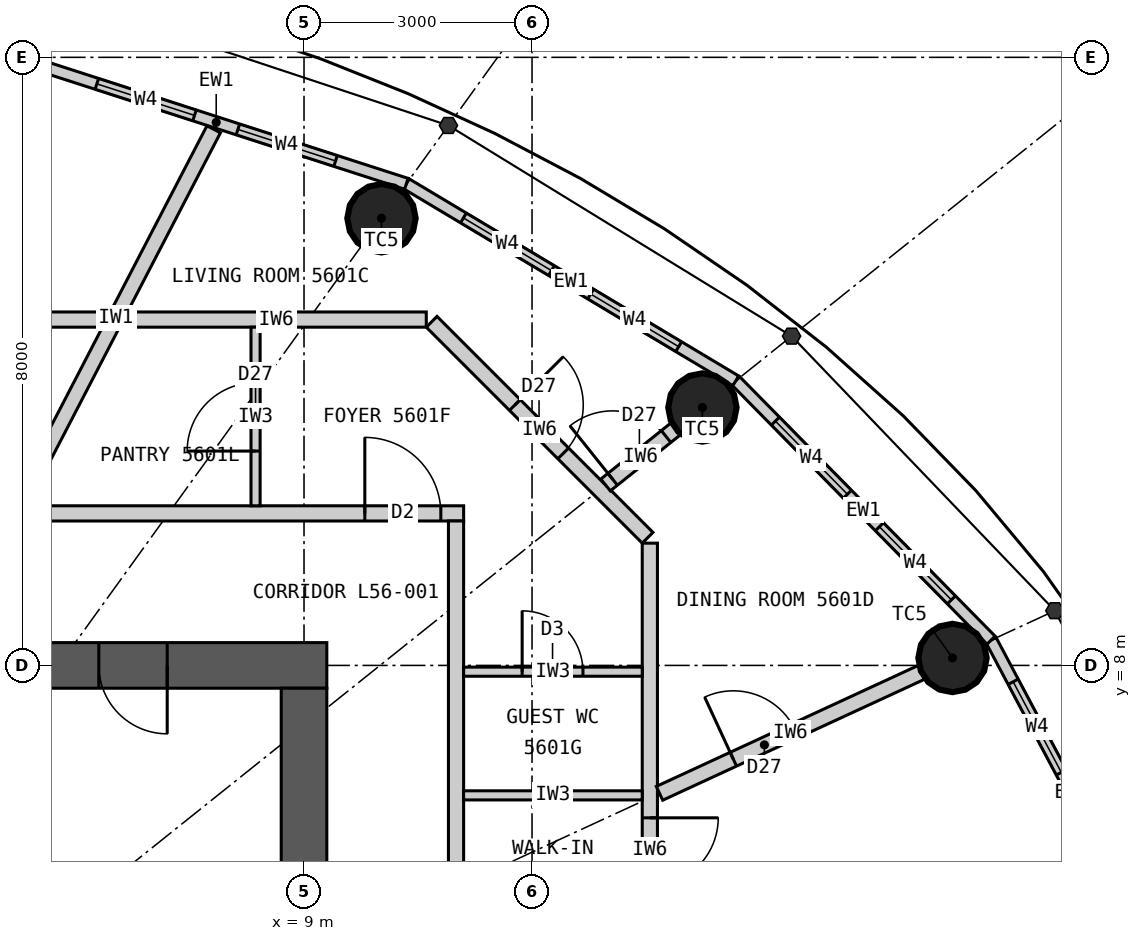
"""IFC4 building model, lengths in metres.
Left out: names, types, materials, properties, quantities, classifications, styles, units other than length and angle.
Written with IfcOpenShell. Run it as: python <this file> out.ifc"""

import sys

from ifc_helpers import new_model, si_unit, direction, frame, frame_2d, origin, origin_2d, place, context, subcontext, project, spatial, rectangle, circle, extrude, element, fill, save


model = new_model("IFC4")
c1 = context("Model", 3, precision=1e-05, world=origin(), true_north=direction((0.0, 1.0)))
c2 = subcontext(c1, "Body", "Model", "MODEL_VIEW")
j1 = project(units=[si_unit("LENGTHUNIT", "METRE"), si_unit("PLANEANGLEUNIT", "RADIAN")], contexts=[c1])
p1 = place(None, origin())
s1 = spatial("IfcSite", under=j1, at=p1, CompositionType="ELEMENT")
p2 = place(p1, origin())
s2 = spatial("IfcBuilding", under=s1, at=p2, CompositionType="ELEMENT")
p3 = place(p2, frame((0.0, 0.0, 209.4)))
s3 = spatial("IfcBuildingStorey", under=s2, at=p3, CompositionType="ELEMENT", Elevation=209.4)
for number, where, z_axis, x_axis in (
    (1, (17.532, 8.098, 0.0), (0.0, 0.0, 1.0), (1.0, 0.0, 0.0)),
    (2, (14.241, 11.393, 0.0), (0.0, 0.0, 1.0), (1.0, 0.0, 0.0)),
    (3, (10.019, 13.883, 0.0), (0.0, 0.0, 1.0), (1.0, 0.0, 0.0)),
):
    element("IfcColumn", number, at=place(p3, frame(where, z_axis=z_axis, x_axis=x_axis)), inside=s3, PredefinedType="COLUMN", context=c2, shape_type="SweptSolid", body=[
        extrude(circle(Radius=0.45, at=origin_2d()), origin(), (0.0, 0.0, 1.0), 3.3),
    ])
p4 = place(p3, frame((-9.3, 8.0, 0.0), z_axis=(0.0, 0.0, 1.0), x_axis=(1.0, 0.0, 0.0)))
e4 = element("IfcWall", 4, at=p4, inside=s3, PredefinedType="SHEAR", context=c2, shape_type="SweptSolid", body=[
    extrude(rectangle(XDim=18.6, YDim=0.6, at=frame_2d((9.3, 0.0))), origin(), (0.0, 0.0, 1.0), 3.3),
])
p5 = place(p4, frame((8.0, 0.0, 0.0)))
e5 = element("IfcOpeningElement", 5, at=p5, cuts=e4, PredefinedType="OPENING", context=c2, shape_type="SweptSolid", body=[
    extrude(rectangle(XDim=1.2, YDim=2.2, at=frame_2d((0.6, 1.1))), frame((0.0, 0.31, 0.0), z_axis=(0.0, -1.0, 0.0), x_axis=(1.0, 0.0, 0.0)), (0.0, 0.0, 1.0), 0.62),
])
p6 = place(p4, frame((15.6, 0.0, 0.0)))
e6 = element("IfcOpeningElement", 6, at=p6, cuts=e4, PredefinedType="OPENING", context=c2, shape_type="SweptSolid", body=[
    extrude(rectangle(XDim=0.9, YDim=2.2, at=frame_2d((0.45, 1.1))), frame((0.0, 0.31, 0.0), z_axis=(0.0, -1.0, 0.0), x_axis=(1.0, 0.0, 0.0)), (0.0, 0.0, 1.0), 0.62),
])
p7 = place(p3, frame((9.0, -7.7, 0.0), z_axis=(0.0, 0.0, 1.0), x_axis=(0.0, 1.0, 0.0)))
e7 = element("IfcWall", 7, at=p7, inside=s3, PredefinedType="SHEAR", context=c2, shape_type="SweptSolid", body=[
    extrude(rectangle(XDim=15.4, YDim=0.6, at=frame_2d((7.7, 0.0))), origin(), (0.0, 0.0, 1.0), 3.3),
])
p8 = place(p7, frame((6.8, 0.0, 0.0)))
e8 = element("IfcOpeningElement", 8, at=p8, cuts=e7, PredefinedType="OPENING", context=c2, shape_type="SweptSolid", body=[
    extrude(rectangle(XDim=1.8, YDim=2.2, at=frame_2d((0.9, 1.1))), frame((0.0, 0.31, 0.0), z_axis=(0.0, -1.0, 0.0), x_axis=(1.0, 0.0, 0.0)), (0.0, 0.0, 1.0), 0.62),
])
p9 = place(p3, frame((20.17, 4.323, 0.0), z_axis=(0.0, 0.0, 1.0), x_axis=(-0.469256152955, 0.883062094597, 0.0)))
e9 = element("IfcWall", 9, at=p9, inside=s3, PredefinedType="ELEMENTEDWALL", context=c2, shape_type="SweptSolid", body=[
    extrude(rectangle(XDim=4.539, YDim=0.15, at=frame_2d((2.27, 0.0))), origin(), (0.0, 0.0, 1.0), 3.12),
])
p10 = place(p9, frame((0.62, 0.0, 0.9)))
e10 = element("IfcOpeningElement", 10, at=p10, cuts=e9, PredefinedType="OPENING", context=c2, shape_type="SweptSolid", body=[
    extrude(rectangle(XDim=1.35, YDim=1.9, at=frame_2d((0.675, 0.95))), frame((0.0, 0.085, 0.0), z_axis=(0.0, -1.0, 0.0), x_axis=(1.0, 0.0, 0.0)), (0.0, 0.0, 1.0), 0.17),
])
p11 = place(p9, frame((2.57, 0.0, 0.9)))
e11 = element("IfcOpeningElement", 11, at=p11, cuts=e9, PredefinedType="OPENING", context=c2, shape_type="SweptSolid", body=[
    extrude(rectangle(XDim=1.35, YDim=1.9, at=frame_2d((0.675, 0.95))), frame((0.0, 0.085, 0.0), z_axis=(0.0, -1.0, 0.0), x_axis=(1.0, 0.0, 0.0)), (0.0, 0.0, 1.0), 0.17),
])
p12 = place(p3, frame((18.04, 8.332, 0.0), z_axis=(0.0, 0.0, 1.0), x_axis=(-0.701527379618, 0.712642501993, 0.0)))
e12 = element("IfcWall", 12, at=p12, inside=s3, PredefinedType="ELEMENTEDWALL", context=c2, shape_type="SweptSolid", body=[
    extrude(rectangle(XDim=4.788, YDim=0.15, at=frame_2d((2.394, 0.0))), origin(), (0.0, 0.0, 1.0), 3.12),
])
p13 = place(p12, frame((0.744, 0.0, 0.9)))
e13 = element("IfcOpeningElement", 13, at=p13, cuts=e12, PredefinedType="OPENING", context=c2, shape_type="SweptSolid", body=[
    extrude(rectangle(XDim=1.35, YDim=1.9, at=frame_2d((0.675, 0.95))), frame((0.0, 0.085, 0.0), z_axis=(0.0, -1.0, 0.0), x_axis=(1.0, 0.0, 0.0)), (0.0, 0.0, 1.0), 0.17),
])
p14 = place(p12, frame((2.694, 0.0, 0.9)))
e14 = element("IfcOpeningElement", 14, at=p14, cuts=e12, PredefinedType="OPENING", context=c2, shape_type="SweptSolid", body=[
    extrude(rectangle(XDim=1.35, YDim=1.9, at=frame_2d((0.675, 0.95))), frame((0.0, 0.085, 0.0), z_axis=(0.0, -1.0, 0.0), x_axis=(1.0, 0.0, 0.0)), (0.0, 0.0, 1.0), 0.17),
])
p15 = place(p3, frame((14.68, 11.744, 0.0), z_axis=(0.0, 0.0, 1.0), x_axis=(-0.85822150553, 0.513279502265, 0.0)))
e15 = element("IfcWall", 15, at=p15, inside=s3, PredefinedType="ELEMENTEDWALL", context=c2, shape_type="SweptSolid", body=[
    extrude(rectangle(XDim=5.05, YDim=0.15, at=frame_2d((2.525, 0.0))), origin(), (0.0, 0.0, 1.0), 3.12),
])
p16 = place(p15, frame((0.875, 0.0, 0.9)))
e16 = element("IfcOpeningElement", 16, at=p16, cuts=e15, PredefinedType="OPENING", context=c2, shape_type="SweptSolid", body=[
    extrude(rectangle(XDim=1.35, YDim=1.9, at=frame_2d((0.675, 0.95))), frame((0.0, 0.085, 0.0), z_axis=(0.0, -1.0, 0.0), x_axis=(1.0, 0.0, 0.0)), (0.0, 0.0, 1.0), 0.17),
])
p17 = place(p15, frame((2.825, 0.0, 0.9)))
e17 = element("IfcOpeningElement", 17, at=p17, cuts=e15, PredefinedType="OPENING", context=c2, shape_type="SweptSolid", body=[
    extrude(rectangle(XDim=1.35, YDim=1.9, at=frame_2d((0.675, 0.95))), frame((0.0, 0.085, 0.0), z_axis=(0.0, -1.0, 0.0), x_axis=(1.0, 0.0, 0.0)), (0.0, 0.0, 1.0), 0.17),
])
p18 = place(p3, frame((10.346, 14.336, 0.0), z_axis=(0.0, 0.0, 1.0), x_axis=(-0.951644702515, 0.307200846638, 0.0)))
e18 = element("IfcWall", 18, at=p18, inside=s3, PredefinedType="ELEMENTEDWALL", context=c2, shape_type="SweptSolid", body=[
    extrude(rectangle(XDim=5.258, YDim=0.15, at=frame_2d((2.629, 0.0))), origin(), (0.0, 0.0, 1.0), 3.12),
])
p19 = place(p18, frame((0.979, 0.0, 0.9)))
e19 = element("IfcOpeningElement", 19, at=p19, cuts=e18, PredefinedType="OPENING", context=c2, shape_type="SweptSolid", body=[
    extrude(rectangle(XDim=1.35, YDim=1.9, at=frame_2d((0.675, 0.95))), frame((0.0, 0.085, 0.0), z_axis=(0.0, -1.0, 0.0), x_axis=(1.0, 0.0, 0.0)), (0.0, 0.0, 1.0), 0.17),
])
p20 = place(p18, frame((2.929, 0.0, 0.9)))
e20 = element("IfcOpeningElement", 20, at=p20, cuts=e18, PredefinedType="OPENING", context=c2, shape_type="SweptSolid", body=[
    extrude(rectangle(XDim=1.35, YDim=1.9, at=frame_2d((0.675, 0.95))), frame((0.0, 0.085, 0.0), z_axis=(0.0, -1.0, 0.0), x_axis=(1.0, 0.0, 0.0)), (0.0, 0.0, 1.0), 0.17),
])
p21 = place(p3, frame((-11.1, 10.0, 0.0), z_axis=(0.0, 0.0, 1.0), x_axis=(1.0, 0.0, 0.0)))
e21 = element("IfcWall", 21, at=p21, inside=s3, PredefinedType="PARTITIONING", context=c2, shape_type="SweptSolid", body=[
    extrude(rectangle(XDim=22.2, YDim=0.2, at=frame_2d((11.1, 0.0))), origin(), (0.0, 0.0, 1.0), 3.12),
])
p22 = place(p21, frame((20.9, 0.0, 0.0)))
e22 = element("IfcOpeningElement", 22, at=p22, cuts=e21, PredefinedType="OPENING", context=c2, shape_type="SweptSolid", body=[
    extrude(rectangle(XDim=1.0, YDim=2.2, at=frame_2d((0.5, 1.1))), frame((0.0, 0.11, 0.0), z_axis=(0.0, -1.0, 0.0), x_axis=(1.0, 0.0, 0.0)), (0.0, 0.0, 1.0), 0.22),
])
p23 = place(p21, frame((4.329, 0.0, 0.0)))
e23 = element("IfcOpeningElement", 23, at=p23, cuts=e21, PredefinedType="OPENING", context=c2, shape_type="SweptSolid", body=[
    extrude(rectangle(XDim=1.0, YDim=2.2, at=frame_2d((0.5, 1.1))), frame((0.0, 0.11, 0.0), z_axis=(0.0, -1.0, 0.0), x_axis=(1.0, 0.0, 0.0)), (0.0, 0.0, 1.0), 0.22),
])
p24 = place(p3, frame((11.0, -9.9, 0.0), z_axis=(0.0, 0.0, 1.0), x_axis=(0.0, 1.0, 0.0)))
e24 = element("IfcWall", 24, at=p24, inside=s3, PredefinedType="PARTITIONING", context=c2, shape_type="SweptSolid", body=[
    extrude(rectangle(XDim=19.8, YDim=0.2, at=frame_2d((9.9, 0.0))), origin(), (0.0, 0.0, 1.0), 3.12),
])
p25 = place(p3, frame((5.241, 10.1, 0.0), z_axis=(0.0, 0.0, 1.0), x_axis=(0.460603196597, 0.887606160008, 0.0)))
e25 = element("IfcWall", 25, at=p25, inside=s3, PredefinedType="PARTITIONING", context=c2, shape_type="SweptSolid", body=[
    extrude(rectangle(XDim=5.58, YDim=0.2, at=frame_2d((2.79, 0.0))), origin(), (0.0, 0.0, 1.0), 3.12),
])
p26 = place(p3, frame((13.55, 1.525, 0.0), z_axis=(0.0, 0.0, 1.0), x_axis=(0.0, 1.0, 0.0)))
e26 = element("IfcWall", 26, at=p26, inside=s3, PredefinedType="PARTITIONING", context=c2, shape_type="SweptSolid", body=[
    extrude(rectangle(XDim=8.084, YDim=0.2, at=frame_2d((4.042, 0.0))), origin(), (0.0, 0.0, 1.0), 3.12),
])
p27 = place(p26, frame((1.597, 0.0, 0.0)))
e27 = element("IfcOpeningElement", 27, at=p27, cuts=e26, PredefinedType="OPENING", context=c2, shape_type="SweptSolid", body=[
    extrude(rectangle(XDim=0.8, YDim=2.1, at=frame_2d((0.4, 1.05))), frame((0.0, 0.11, 0.0), z_axis=(0.0, -1.0, 0.0), x_axis=(1.0, 0.0, 0.0)), (0.0, 0.0, 1.0), 0.22),
])
p28 = place(p26, frame((3.57, 0.0, 0.0)))
e28 = element("IfcOpeningElement", 28, at=p28, cuts=e26, PredefinedType="OPENING", context=c2, shape_type="SweptSolid", body=[
    extrude(rectangle(XDim=0.9, YDim=2.1, at=frame_2d((0.45, 1.05))), frame((0.0, 0.11, 0.0), z_axis=(0.0, -1.0, 0.0), x_axis=(1.0, 0.0, 0.0)), (0.0, 0.0, 1.0), 0.22),
])
p29 = place(p3, frame((13.521, 9.679, 0.0), z_axis=(0.0, 0.0, 1.0), x_axis=(-0.707106781187, 0.707106781187, 0.0)))
e29 = element("IfcWall", 29, at=p29, inside=s3, PredefinedType="PARTITIONING", context=c2, shape_type="SweptSolid", body=[
    extrude(rectangle(XDim=4.019, YDim=0.2, at=frame_2d((2.009, 0.0))), origin(), (0.0, 0.0, 1.0), 3.12),
])
p30 = place(p29, frame((1.57, 0.0, 0.0)))
e30 = element("IfcOpeningElement", 30, at=p30, cuts=e29, PredefinedType="OPENING", context=c2, shape_type="SweptSolid", body=[
    extrude(rectangle(XDim=0.9, YDim=2.1, at=frame_2d((0.45, 1.05))), frame((0.0, 0.11, 0.0), z_axis=(0.0, -1.0, 0.0), x_axis=(1.0, 0.0, 0.0)), (0.0, 0.0, 1.0), 0.22),
])
p31 = place(p3, frame((10.609, 12.55, 0.0), z_axis=(0.0, 0.0, 1.0), x_axis=(-1.0, 0.0, 0.0)))
e31 = element("IfcWall", 31, at=p31, inside=s3, PredefinedType="PARTITIONING", context=c2, shape_type="SweptSolid", body=[
    extrude(rectangle(XDim=3.947, YDim=0.2, at=frame_2d((1.974, 0.0))), origin(), (0.0, 0.0, 1.0), 3.12),
])
p32 = place(p3, frame((13.677, 6.317, 0.0), z_axis=(0.0, 0.0, 1.0), x_axis=(0.907825704695, 0.419347695708, 0.0)))
e32 = element("IfcWall", 32, at=p32, inside=s3, PredefinedType="PARTITIONING", context=c2, shape_type="SweptSolid", body=[
    extrude(rectangle(XDim=3.796, YDim=0.2, at=frame_2d((1.898, 0.0))), origin(), (0.0, 0.0, 1.0), 2.32),
])
p33 = place(p32, frame((1.07, 0.0, 0.0)))
e33 = element("IfcOpeningElement", 33, at=p33, cuts=e32, PredefinedType="OPENING", context=c2, shape_type="SweptSolid", body=[
    extrude(rectangle(XDim=0.9, YDim=2.1, at=frame_2d((0.45, 1.05))), frame((0.0, 0.11, 0.0), z_axis=(0.0, -1.0, 0.0), x_axis=(1.0, 0.0, 0.0)), (0.0, 0.0, 1.0), 0.22),
])
p34 = place(p3, frame((12.968, 10.374, 0.0), z_axis=(0.0, 0.0, 1.0), x_axis=(0.780888968944, 0.624669847345, 0.0)))
e34 = element("IfcWall", 34, at=p34, inside=s3, PredefinedType="PARTITIONING", context=c2, shape_type="SweptSolid", body=[
    extrude(rectangle(XDim=1.181, YDim=0.2, at=frame_2d((0.591, 0.0))), origin(), (0.0, 0.0, 1.0), 2.42),
])
p35 = place(p34, frame((0.12, 0.0, 0.0)))
e35 = element("IfcOpeningElement", 35, at=p35, cuts=e34, PredefinedType="OPENING", context=c2, shape_type="SweptSolid", body=[
    extrude(rectangle(XDim=0.9, YDim=2.1, at=frame_2d((0.45, 1.05))), frame((0.0, 0.11, 0.0), z_axis=(0.0, -1.0, 0.0), x_axis=(1.0, 0.0, 0.0)), (0.0, 0.0, 1.0), 0.22),
])
p36 = place(p3, frame((11.1, 6.29, 0.0), z_axis=(0.0, 0.0, 1.0), x_axis=(1.0, 0.0, 0.0)))
e36 = element("IfcWall", 36, at=p36, inside=s3, PredefinedType="PARTITIONING", context=c2, shape_type="SweptSolid", body=[
    extrude(rectangle(XDim=2.35, YDim=0.12, at=frame_2d((1.175, 0.0))), origin(), (0.0, 0.0, 1.0), 3.12),
])
p37 = place(p3, frame((11.1, 7.917, 0.0), z_axis=(0.0, 0.0, 1.0), x_axis=(1.0, 0.0, 0.0)))
e37 = element("IfcWall", 37, at=p37, inside=s3, PredefinedType="PARTITIONING", context=c2, shape_type="SweptSolid", body=[
    extrude(rectangle(XDim=2.35, YDim=0.12, at=frame_2d((1.175, 0.0))), origin(), (0.0, 0.0, 1.0), 3.12),
])
p38 = place(p37, frame((0.77, 0.0, 0.0)))
e38 = element("IfcOpeningElement", 38, at=p38, cuts=e37, PredefinedType="OPENING", context=c2, shape_type="SweptSolid", body=[
    extrude(rectangle(XDim=0.8, YDim=2.1, at=frame_2d((0.4, 1.05))), frame((0.0, 0.07, 0.0), z_axis=(0.0, -1.0, 0.0), x_axis=(1.0, 0.0, 0.0)), (0.0, 0.0, 1.0), 0.14),
])
p39 = place(p3, frame((8.363, 10.1, 0.0), z_axis=(0.0, 0.0, 1.0), x_axis=(0.0, 1.0, 0.0)))
e39 = element("IfcWall", 39, at=p39, inside=s3, PredefinedType="PARTITIONING", context=c2, shape_type="SweptSolid", body=[
    extrude(rectangle(XDim=2.35, YDim=0.12, at=frame_2d((1.175, 0.0))), origin(), (0.0, 0.0, 1.0), 3.12),
])
p40 = place(p39, frame((0.72, 0.0, 0.0)))
e40 = element("IfcOpeningElement", 40, at=p40, cuts=e39, PredefinedType="OPENING", context=c2, shape_type="SweptSolid", body=[
    extrude(rectangle(XDim=0.9, YDim=2.1, at=frame_2d((0.45, 1.05))), frame((0.0, 0.07, 0.0), z_axis=(0.0, -1.0, 0.0), x_axis=(1.0, 0.0, 0.0)), (0.0, 0.0, 1.0), 0.14),
])
p41 = place(p3, frame((6.364, 12.55, 0.0), z_axis=(0.0, 0.0, 1.0), x_axis=(-1.0, 0.0, 0.0)))
e41 = element("IfcWall", 41, at=p41, inside=s3, PredefinedType="PARTITIONING", context=c2, shape_type="SweptSolid", body=[
    extrude(rectangle(XDim=16.972, YDim=0.2, at=frame_2d((8.486, 0.0))), origin(), (0.0, 0.0, 1.0), 3.12),
])
p42 = place(p41, frame((2.525, 0.0, 0.0)))
e42 = element("IfcOpeningElement", 42, at=p42, cuts=e41, PredefinedType="OPENING", context=c2, shape_type="SweptSolid", body=[
    extrude(rectangle(XDim=0.8, YDim=2.1, at=frame_2d((0.4, 1.05))), frame((0.0, 0.11, 0.0), z_axis=(0.0, -1.0, 0.0), x_axis=(1.0, 0.0, 0.0)), (0.0, 0.0, 1.0), 0.22),
])
p43 = place(p41, frame((4.145, 0.0, 0.0)))
e43 = element("IfcOpeningElement", 43, at=p43, cuts=e41, PredefinedType="OPENING", context=c2, shape_type="SweptSolid", body=[
    extrude(rectangle(XDim=0.9, YDim=2.1, at=frame_2d((0.45, 1.05))), frame((0.0, 0.11, 0.0), z_axis=(0.0, -1.0, 0.0), x_axis=(1.0, 0.0, 0.0)), (0.0, 0.0, 1.0), 0.22),
])
p44 = place(p41, frame((13.52, 0.0, 0.0)))
e44 = element("IfcOpeningElement", 44, at=p44, cuts=e41, PredefinedType="OPENING", context=c2, shape_type="SweptSolid", body=[
    extrude(rectangle(XDim=0.9, YDim=2.1, at=frame_2d((0.45, 1.05))), frame((0.0, 0.11, 0.0), z_axis=(0.0, -1.0, 0.0), x_axis=(1.0, 0.0, 0.0)), (0.0, 0.0, 1.0), 0.22),
])
p45 = place(p11, origin())
e45 = element("IfcWindow", 45, at=p45, inside=s3, PartitioningType="SINGLE_PANEL", PredefinedType="WINDOW", context=c2, shape_type="SweptSolid", body=[
    extrude(rectangle(XDim=1.35, YDim=1.9, at=frame_2d((0.675, 0.95))), frame((0.0, 0.03, 0.0), z_axis=(0.0, -1.0, 0.0), x_axis=(1.0, 0.0, 0.0)), (0.0, 0.0, 1.0), 0.06),
])
fill(e11, e45)
p46 = place(p13, origin())
e46 = element("IfcWindow", 46, at=p46, inside=s3, PartitioningType="SINGLE_PANEL", PredefinedType="WINDOW", context=c2, shape_type="SweptSolid", body=[
    extrude(rectangle(XDim=1.35, YDim=1.9, at=frame_2d((0.675, 0.95))), frame((0.0, 0.03, 0.0), z_axis=(0.0, -1.0, 0.0), x_axis=(1.0, 0.0, 0.0)), (0.0, 0.0, 1.0), 0.06),
])
fill(e13, e46)
p47 = place(p14, origin())
e47 = element("IfcWindow", 47, at=p47, inside=s3, PartitioningType="SINGLE_PANEL", PredefinedType="WINDOW", context=c2, shape_type="SweptSolid", body=[
    extrude(rectangle(XDim=1.35, YDim=1.9, at=frame_2d((0.675, 0.95))), frame((0.0, 0.03, 0.0), z_axis=(0.0, -1.0, 0.0), x_axis=(1.0, 0.0, 0.0)), (0.0, 0.0, 1.0), 0.06),
])
fill(e14, e47)
p48 = place(p16, origin())
e48 = element("IfcWindow", 48, at=p48, inside=s3, PartitioningType="SINGLE_PANEL", PredefinedType="WINDOW", context=c2, shape_type="SweptSolid", body=[
    extrude(rectangle(XDim=1.35, YDim=1.9, at=frame_2d((0.675, 0.95))), frame((0.0, 0.03, 0.0), z_axis=(0.0, -1.0, 0.0), x_axis=(1.0, 0.0, 0.0)), (0.0, 0.0, 1.0), 0.06),
])
fill(e16, e48)
p49 = place(p17, origin())
e49 = element("IfcWindow", 49, at=p49, inside=s3, PartitioningType="SINGLE_PANEL", PredefinedType="WINDOW", context=c2, shape_type="SweptSolid", body=[
    extrude(rectangle(XDim=1.35, YDim=1.9, at=frame_2d((0.675, 0.95))), frame((0.0, 0.03, 0.0), z_axis=(0.0, -1.0, 0.0), x_axis=(1.0, 0.0, 0.0)), (0.0, 0.0, 1.0), 0.06),
])
fill(e17, e49)
p50 = place(p19, origin())
e50 = element("IfcWindow", 50, at=p50, inside=s3, PartitioningType="SINGLE_PANEL", PredefinedType="WINDOW", context=c2, shape_type="SweptSolid", body=[
    extrude(rectangle(XDim=1.35, YDim=1.9, at=frame_2d((0.675, 0.95))), frame((0.0, 0.03, 0.0), z_axis=(0.0, -1.0, 0.0), x_axis=(1.0, 0.0, 0.0)), (0.0, 0.0, 1.0), 0.06),
])
fill(e19, e50)
p51 = place(p20, origin())
e51 = element("IfcWindow", 51, at=p51, inside=s3, PartitioningType="SINGLE_PANEL", PredefinedType="WINDOW", context=c2, shape_type="SweptSolid", body=[
    extrude(rectangle(XDim=1.35, YDim=1.9, at=frame_2d((0.675, 0.95))), frame((0.0, 0.03, 0.0), z_axis=(0.0, -1.0, 0.0), x_axis=(1.0, 0.0, 0.0)), (0.0, 0.0, 1.0), 0.06),
])
fill(e20, e51)
p52 = place(p22, origin())
e52 = element("IfcDoor", 52, at=p52, inside=s3, OperationType="SINGLE_SWING_LEFT", PredefinedType="DOOR", context=c2, shape_type="SweptSolid", body=[
    extrude(rectangle(XDim=1.0, YDim=2.2, at=frame_2d((0.5, 1.1))), frame((0.0, 0.025, 0.0), z_axis=(0.0, -1.0, 0.0), x_axis=(1.0, 0.0, 0.0)), (0.0, 0.0, 1.0), 0.05),
])
fill(e22, e52)
p53 = place(p28, origin())
e53 = element("IfcDoor", 53, at=p53, inside=s3, OperationType="SINGLE_SWING_RIGHT", PredefinedType="DOOR", context=c2, shape_type="SweptSolid", body=[
    extrude(rectangle(XDim=0.9, YDim=2.1, at=frame_2d((0.45, 1.05))), frame((0.0, 0.025, 0.0), z_axis=(0.0, -1.0, 0.0), x_axis=(1.0, 0.0, 0.0)), (0.0, 0.0, 1.0), 0.05),
])
fill(e28, e53)
p54 = place(p38, origin())
e54 = element("IfcDoor", 54, at=p54, inside=s3, OperationType="SINGLE_SWING_LEFT", PredefinedType="DOOR", context=c2, shape_type="SweptSolid", body=[
    extrude(rectangle(XDim=0.8, YDim=2.1, at=frame_2d((0.4, 1.05))), frame((0.0, 0.025, 0.0), z_axis=(0.0, -1.0, 0.0), x_axis=(1.0, 0.0, 0.0)), (0.0, 0.0, 1.0), 0.05),
])
fill(e38, e54)
p55 = place(p40, origin())
e55 = element("IfcDoor", 55, at=p55, inside=s3, OperationType="SINGLE_SWING_LEFT", PredefinedType="DOOR", context=c2, shape_type="SweptSolid", body=[
    extrude(rectangle(XDim=0.9, YDim=2.1, at=frame_2d((0.45, 1.05))), frame((0.0, 0.025, 0.0), z_axis=(0.0, -1.0, 0.0), x_axis=(1.0, 0.0, 0.0)), (0.0, 0.0, 1.0), 0.05),
])
fill(e40, e55)
p56 = place(p30, origin())
e56 = element("IfcDoor", 56, at=p56, inside=s3, OperationType="SINGLE_SWING_RIGHT", PredefinedType="DOOR", context=c2, shape_type="SweptSolid", body=[
    extrude(rectangle(XDim=0.9, YDim=2.1, at=frame_2d((0.45, 1.05))), frame((0.0, 0.025, 0.0), z_axis=(0.0, -1.0, 0.0), x_axis=(1.0, 0.0, 0.0)), (0.0, 0.0, 1.0), 0.05),
])
fill(e30, e56)
p57 = place(p33, origin())
e57 = element("IfcDoor", 57, at=p57, inside=s3, OperationType="SINGLE_SWING_LEFT", PredefinedType="DOOR", context=c2, shape_type="SweptSolid", body=[
    extrude(rectangle(XDim=0.9, YDim=2.1, at=frame_2d((0.45, 1.05))), frame((0.0, 0.025, 0.0), z_axis=(0.0, -1.0, 0.0), x_axis=(1.0, 0.0, 0.0)), (0.0, 0.0, 1.0), 0.05),
])
fill(e33, e57)
p58 = place(p35, origin())
e58 = element("IfcDoor", 58, at=p58, inside=s3, OperationType="SINGLE_SWING_LEFT", PredefinedType="DOOR", context=c2, shape_type="SweptSolid", body=[
    extrude(rectangle(XDim=0.9, YDim=2.1, at=frame_2d((0.45, 1.05))), frame((0.0, 0.025, 0.0), z_axis=(0.0, -1.0, 0.0), x_axis=(1.0, 0.0, 0.0)), (0.0, 0.0, 1.0), 0.05),
])
fill(e35, e58)
p59 = place(p6, origin())
e59 = element("IfcDoor", 59, at=p59, inside=s3, OperationType="SINGLE_SWING_RIGHT", PredefinedType="DOOR", context=c2, shape_type="SweptSolid", body=[
    extrude(rectangle(XDim=0.9, YDim=2.2, at=frame_2d((0.45, 1.1))), frame((0.0, 0.025, 0.0), z_axis=(0.0, -1.0, 0.0), x_axis=(1.0, 0.0, 0.0)), (0.0, 0.0, 1.0), 0.05),
])
fill(e6, e59)
save(model, sys.argv[1])
